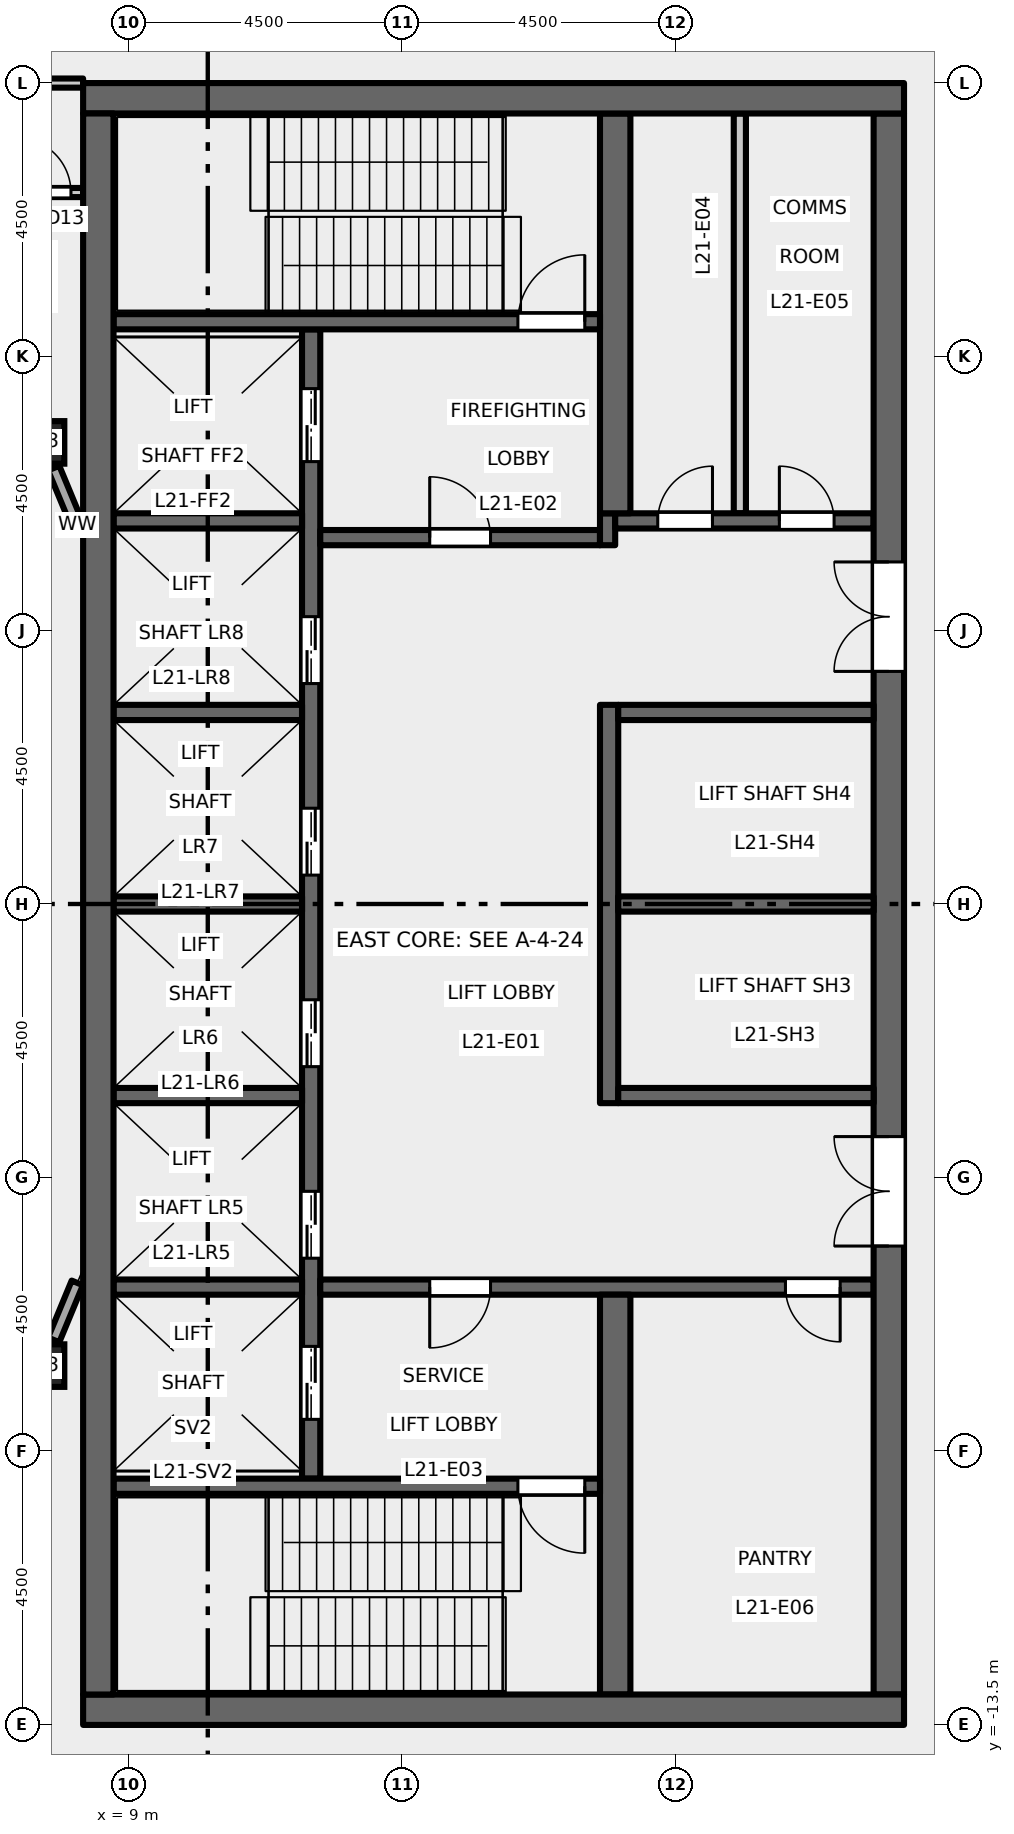
"""IFC4 building model, lengths in metres.
Left out: names, types, materials, properties, quantities, classifications, styles, units other than length and angle.
Written with IfcOpenShell. Run it as: python <this file> out.ifc"""

import sys

from ifc_helpers import new_model, si_unit, direction, frame, frame_2d, origin, origin_2d, place, context, subcontext, project, spatial, rectangle, hollow_rectangle, extrude, element, fill, save


model = new_model("IFC4")
c1 = context("Model", 3, precision=1e-05, world=origin(), true_north=direction((0.0, 1.0)))
c2 = subcontext(c1, "Body", "Model", "MODEL_VIEW")
j1 = project(units=[si_unit("LENGTHUNIT", "METRE"), si_unit("PLANEANGLEUNIT", "RADIAN")], contexts=[c1])
p1 = place(None, origin())
s1 = spatial("IfcSite", under=j1, at=p1, CompositionType="ELEMENT")
p2 = place(p1, origin())
s2 = spatial("IfcBuilding", under=s1, at=p2, CompositionType="ELEMENT")
p3 = place(p2, frame((0.0, 0.0, 99.2)))
s3 = spatial("IfcBuildingStorey", under=s2, at=p3, CompositionType="ELEMENT", Elevation=99.2)
for number, where, z_axis, x_axis in (
    (1, (7.591, -7.591, 0.0), (0.0, 0.0, 1.0), (1.0, 0.0, 0.0)),
    (2, (7.591, 7.591, 0.0), (0.0, 0.0, 1.0), (1.0, 0.0, 0.0)),
):
    element("IfcColumn", number, at=place(p3, frame(where, z_axis=z_axis, x_axis=x_axis)), inside=s3, PredefinedType="COLUMN", context=c2, shape_type="SweptSolid", body=[
        extrude(hollow_rectangle(XDim=0.7, YDim=0.7, WallThickness=0.04, at=origin_2d()), origin(), (0.0, 0.0, 1.0), 5.5),
    ])
p4 = place(p3, frame((12.0, -9.45, 0.0), z_axis=(0.0, 0.0, 1.0), x_axis=(0.0, 1.0, 0.0)))
e3 = element("IfcWall", 3, at=p4, inside=s3, PredefinedType="SHEAR", context=c2, shape_type="SweptSolid", body=[
    extrude(rectangle(XDim=18.9, YDim=0.3, at=frame_2d((9.45, 0.0))), origin(), (0.0, 0.0, 1.0), 5.35),
])
p5 = place(p4, frame((3.625, 0.0, 0.0)))
e4 = element("IfcOpeningElement", 4, at=p5, cuts=e3, PredefinedType="OPENING", context=c2, shape_type="SweptSolid", body=[
    extrude(rectangle(XDim=1.1, YDim=2.1, at=frame_2d((0.55, 1.05))), frame((0.0, 0.16, 0.0), z_axis=(0.0, -1.0, 0.0), x_axis=(1.0, 0.0, 0.0)), (0.0, 0.0, 1.0), 0.32),
])
p6 = place(p4, frame((6.775, 0.0, 0.0)))
e5 = element("IfcOpeningElement", 5, at=p6, cuts=e3, PredefinedType="OPENING", context=c2, shape_type="SweptSolid", body=[
    extrude(rectangle(XDim=1.1, YDim=2.1, at=frame_2d((0.55, 1.05))), frame((0.0, 0.16, 0.0), z_axis=(0.0, -1.0, 0.0), x_axis=(1.0, 0.0, 0.0)), (0.0, 0.0, 1.0), 0.32),
])
p7 = place(p4, frame((9.925, 0.0, 0.0)))
e6 = element("IfcOpeningElement", 6, at=p7, cuts=e3, PredefinedType="OPENING", context=c2, shape_type="SweptSolid", body=[
    extrude(rectangle(XDim=1.1, YDim=2.1, at=frame_2d((0.55, 1.05))), frame((0.0, 0.16, 0.0), z_axis=(0.0, -1.0, 0.0), x_axis=(1.0, 0.0, 0.0)), (0.0, 0.0, 1.0), 0.32),
])
p8 = place(p4, frame((13.075, 0.0, 0.0)))
e7 = element("IfcOpeningElement", 7, at=p8, cuts=e3, PredefinedType="OPENING", context=c2, shape_type="SweptSolid", body=[
    extrude(rectangle(XDim=1.1, YDim=2.1, at=frame_2d((0.55, 1.05))), frame((0.0, 0.16, 0.0), z_axis=(0.0, -1.0, 0.0), x_axis=(1.0, 0.0, 0.0)), (0.0, 0.0, 1.0), 0.32),
])
p9 = place(p4, frame((16.725, 0.0, 0.0)))
e8 = element("IfcOpeningElement", 8, at=p9, cuts=e3, PredefinedType="OPENING", context=c2, shape_type="SweptSolid", body=[
    extrude(rectangle(XDim=1.2, YDim=2.1, at=frame_2d((0.6, 1.05))), frame((0.0, 0.16, 0.0), z_axis=(0.0, -1.0, 0.0), x_axis=(1.0, 0.0, 0.0)), (0.0, 0.0, 1.0), 0.32),
])
p10 = place(p4, frame((0.975, 0.0, 0.0)))
e9 = element("IfcOpeningElement", 9, at=p10, cuts=e3, PredefinedType="OPENING", context=c2, shape_type="SweptSolid", body=[
    extrude(rectangle(XDim=1.2, YDim=2.1, at=frame_2d((0.6, 1.05))), frame((0.0, 0.16, 0.0), z_axis=(0.0, -1.0, 0.0), x_axis=(1.0, 0.0, 0.0)), (0.0, 0.0, 1.0), 0.32),
])
p11 = place(p3, frame((12.15, 6.025, 0.0), z_axis=(0.0, 0.0, 1.0), x_axis=(1.0, 0.0, 0.0)))
e10 = element("IfcWall", 10, at=p11, inside=s3, PredefinedType="SHEAR", context=c2, shape_type="SweptSolid", body=[
    extrude(rectangle(XDim=4.6, YDim=0.25, at=frame_2d((2.3, 0.0))), origin(), (0.0, 0.0, 1.0), 5.35),
])
p12 = place(p11, frame((1.8, 0.0, 0.0)))
e11 = element("IfcOpeningElement", 11, at=p12, cuts=e10, PredefinedType="OPENING", context=c2, shape_type="SweptSolid", body=[
    extrude(rectangle(XDim=1.0, YDim=2.1, at=frame_2d((0.5, 1.05))), frame((0.0, 0.135, 0.0), z_axis=(0.0, -1.0, 0.0), x_axis=(1.0, 0.0, 0.0)), (0.0, 0.0, 1.0), 0.27),
])
p13 = place(p3, frame((16.875, 5.9, 0.0), z_axis=(0.0, 0.0, 1.0), x_axis=(0.0, 1.0, 0.0)))
e12 = element("IfcWall", 12, at=p13, inside=s3, PredefinedType="SHEAR", context=c2, shape_type="SweptSolid", body=[
    extrude(rectangle(XDim=0.525, YDim=0.25, at=frame_2d((0.263, 0.0))), origin(), (0.0, 0.0, 1.0), 5.35),
])
p14 = place(p3, frame((17.0, 6.3, 0.0), z_axis=(0.0, 0.0, 1.0), x_axis=(1.0, 0.0, 0.0)))
e13 = element("IfcWall", 13, at=p14, inside=s3, PredefinedType="SHEAR", context=c2, shape_type="SweptSolid", body=[
    extrude(rectangle(XDim=4.25, YDim=0.25, at=frame_2d((2.125, 0.0))), origin(), (0.0, 0.0, 1.0), 5.35),
])
p15 = place(p14, frame((0.7, 0.0, 0.0)))
e14 = element("IfcOpeningElement", 14, at=p15, cuts=e13, PredefinedType="OPENING", context=c2, shape_type="SweptSolid", body=[
    extrude(rectangle(XDim=0.9, YDim=2.1, at=frame_2d((0.45, 1.05))), frame((0.0, 0.135, 0.0), z_axis=(0.0, -1.0, 0.0), x_axis=(1.0, 0.0, 0.0)), (0.0, 0.0, 1.0), 0.27),
])
p16 = place(p14, frame((2.7, 0.0, 0.0)))
e15 = element("IfcOpeningElement", 15, at=p16, cuts=e13, PredefinedType="OPENING", context=c2, shape_type="SweptSolid", body=[
    extrude(rectangle(XDim=0.9, YDim=2.1, at=frame_2d((0.45, 1.05))), frame((0.0, 0.135, 0.0), z_axis=(0.0, -1.0, 0.0), x_axis=(1.0, 0.0, 0.0)), (0.0, 0.0, 1.0), 0.27),
])
p17 = place(p3, frame((12.15, -6.3, 0.0), z_axis=(0.0, 0.0, 1.0), x_axis=(1.0, 0.0, 0.0)))
e16 = element("IfcWall", 16, at=p17, inside=s3, PredefinedType="SHEAR", context=c2, shape_type="SweptSolid", body=[
    extrude(rectangle(XDim=9.1, YDim=0.25, at=frame_2d((4.55, 0.0))), origin(), (0.0, 0.0, 1.0), 5.35),
])
p18 = place(p17, frame((1.8, 0.0, 0.0)))
e17 = element("IfcOpeningElement", 17, at=p18, cuts=e16, PredefinedType="OPENING", context=c2, shape_type="SweptSolid", body=[
    extrude(rectangle(XDim=1.0, YDim=2.1, at=frame_2d((0.5, 1.05))), frame((0.0, 0.135, 0.0), z_axis=(0.0, -1.0, 0.0), x_axis=(1.0, 0.0, 0.0)), (0.0, 0.0, 1.0), 0.27),
])
p19 = place(p17, frame((7.65, 0.0, 0.0)))
e18 = element("IfcOpeningElement", 18, at=p19, cuts=e16, PredefinedType="OPENING", context=c2, shape_type="SweptSolid", body=[
    extrude(rectangle(XDim=0.9, YDim=2.1, at=frame_2d((0.45, 1.05))), frame((0.0, 0.135, 0.0), z_axis=(0.0, -1.0, 0.0), x_axis=(1.0, 0.0, 0.0)), (0.0, 0.0, 1.0), 0.27),
])
p20 = place(p3, frame((21.5, -13.0, 0.0), z_axis=(0.0, 0.0, 1.0), x_axis=(0.0, 1.0, 0.0)))
e19 = element("IfcWall", 19, at=p20, inside=s3, PredefinedType="SHEAR", context=c2, shape_type="SweptSolid", body=[
    extrude(rectangle(XDim=26.0, YDim=0.5, at=frame_2d((13.0, 0.0))), origin(), (0.0, 0.0, 1.0), 5.35),
])
p21 = place(p20, frame((16.825, 0.0, 0.0)))
e20 = element("IfcOpeningElement", 20, at=p21, cuts=e19, PredefinedType="OPENING", context=c2, shape_type="SweptSolid", body=[
    extrude(rectangle(XDim=1.8, YDim=2.1, at=frame_2d((0.9, 1.05))), frame((0.0, 0.26, 0.0), z_axis=(0.0, -1.0, 0.0), x_axis=(1.0, 0.0, 0.0)), (0.0, 0.0, 1.0), 0.52),
])
p22 = place(p20, frame((7.375, 0.0, 0.0)))
e21 = element("IfcOpeningElement", 21, at=p22, cuts=e19, PredefinedType="OPENING", context=c2, shape_type="SweptSolid", body=[
    extrude(rectangle(XDim=1.8, YDim=2.1, at=frame_2d((0.9, 1.05))), frame((0.0, 0.26, 0.0), z_axis=(0.0, -1.0, 0.0), x_axis=(1.0, 0.0, 0.0)), (0.0, 0.0, 1.0), 0.52),
])
p23 = place(p3, frame((19.05, 6.425, 0.0), z_axis=(0.0, 0.0, 1.0), x_axis=(0.0, 1.0, 0.0)))
e22 = element("IfcWall", 22, at=p23, inside=s3, PredefinedType="PARTITIONING", context=c2, shape_type="SweptSolid", body=[
    extrude(rectangle(XDim=6.575, YDim=0.2, at=frame_2d((3.288, 0.0))), origin(), (0.0, 0.0, 1.0), 5.35),
])
p24 = place(p3, frame((16.9, -3.275, 0.0), z_axis=(0.0, 0.0, 1.0), x_axis=(0.0, 1.0, 0.0)))
e23 = element("IfcWall", 23, at=p24, inside=s3, PredefinedType="SHEAR", context=c2, shape_type="SweptSolid", body=[
    extrude(rectangle(XDim=6.55, YDim=0.3, at=frame_2d((3.275, 0.0))), origin(), (0.0, 0.0, 1.0), 5.35),
])
for number, where, z_axis, x_axis in (
    (24, (17.05, 0.0, 0.0), (0.0, 0.0, 1.0), (1.0, 0.0, 0.0)),
    (25, (17.05, 3.15, 0.0), (0.0, 0.0, 1.0), (1.0, 0.0, 0.0)),
    (26, (17.05, -3.15, 0.0), (0.0, 0.0, 1.0), (1.0, 0.0, 0.0)),
):
    element("IfcWall", number, at=place(p3, frame(where, z_axis=z_axis, x_axis=x_axis)), inside=s3, PredefinedType="SHEAR", context=c2, shape_type="SweptSolid", body=[
        extrude(rectangle(XDim=4.2, YDim=0.25, at=frame_2d((2.1, 0.0))), origin(), (0.0, 0.0, 1.0), 5.35),
    ])
for number, where, z_axis, x_axis in (
    (27, (17.0, 6.425, 0.0), (0.0, 0.0, 1.0), (0.0, 1.0, 0.0)),
    (28, (17.0, -13.0, 0.0), (0.0, 0.0, 1.0), (0.0, 1.0, 0.0)),
):
    element("IfcWall", number, at=place(p3, frame(where, z_axis=z_axis, x_axis=x_axis)), inside=s3, PredefinedType="SHEAR", context=c2, shape_type="SweptSolid", body=[
        extrude(rectangle(XDim=6.575, YDim=0.5, at=frame_2d((3.288, 0.0))), origin(), (0.0, 0.0, 1.0), 5.35),
    ])
for number, where, z_axis, x_axis in (
    (29, (8.75, 0.0, 0.0), (0.0, 0.0, 1.0), (1.0, 0.0, 0.0)),
    (30, (8.75, 3.15, 0.0), (0.0, 0.0, 1.0), (1.0, 0.0, 0.0)),
    (31, (8.75, 6.3, 0.0), (0.0, 0.0, 1.0), (1.0, 0.0, 0.0)),
    (32, (8.75, -3.15, 0.0), (0.0, 0.0, 1.0), (1.0, 0.0, 0.0)),
    (33, (8.75, -6.3, 0.0), (0.0, 0.0, 1.0), (1.0, 0.0, 0.0)),
):
    element("IfcWall", number, at=place(p3, frame(where, z_axis=z_axis, x_axis=x_axis)), inside=s3, PredefinedType="SHEAR", context=c2, shape_type="SweptSolid", body=[
        extrude(rectangle(XDim=3.1, YDim=0.25, at=frame_2d((1.55, 0.0))), origin(), (0.0, 0.0, 1.0), 5.35),
    ])
p25 = place(p3, frame((8.75, 9.575, 0.0), z_axis=(0.0, 0.0, 1.0), x_axis=(1.0, 0.0, 0.0)))
e34 = element("IfcWall", 34, at=p25, inside=s3, PredefinedType="SHEAR", context=c2, shape_type="SweptSolid", body=[
    extrude(rectangle(XDim=8.0, YDim=0.25, at=frame_2d((4.0, 0.0))), origin(), (0.0, 0.0, 1.0), 5.35),
])
p26 = place(p25, frame((6.65, 0.0, 0.0)))
e35 = element("IfcOpeningElement", 35, at=p26, cuts=e34, PredefinedType="OPENING", context=c2, shape_type="SweptSolid", body=[
    extrude(rectangle(XDim=1.1, YDim=2.1, at=frame_2d((0.55, 1.05))), frame((0.0, 0.135, 0.0), z_axis=(0.0, -1.0, 0.0), x_axis=(1.0, 0.0, 0.0)), (0.0, 0.0, 1.0), 0.27),
])
p27 = place(p3, frame((8.75, -9.575, 0.0), z_axis=(0.0, 0.0, 1.0), x_axis=(1.0, 0.0, 0.0)))
e36 = element("IfcWall", 36, at=p27, inside=s3, PredefinedType="SHEAR", context=c2, shape_type="SweptSolid", body=[
    extrude(rectangle(XDim=8.0, YDim=0.25, at=frame_2d((4.0, 0.0))), origin(), (0.0, 0.0, 1.0), 5.35),
])
p28 = place(p27, frame((6.65, 0.0, 0.0)))
e37 = element("IfcOpeningElement", 37, at=p28, cuts=e36, PredefinedType="OPENING", context=c2, shape_type="SweptSolid", body=[
    extrude(rectangle(XDim=1.1, YDim=2.1, at=frame_2d((0.55, 1.05))), frame((0.0, 0.135, 0.0), z_axis=(0.0, -1.0, 0.0), x_axis=(1.0, 0.0, 0.0)), (0.0, 0.0, 1.0), 0.27),
])
for number, where, z_axis, x_axis in (
    (38, (8.25, 13.25, 0.0), (0.0, 0.0, 1.0), (1.0, 0.0, 0.0)),
    (39, (8.25, -13.25, 0.0), (0.0, 0.0, 1.0), (1.0, 0.0, 0.0)),
):
    element("IfcWall", number, at=place(p3, frame(where, z_axis=z_axis, x_axis=x_axis)), inside=s3, PredefinedType="SHEAR", context=c2, shape_type="SweptSolid", body=[
        extrude(rectangle(XDim=13.5, YDim=0.5, at=frame_2d((6.75, 0.0))), origin(), (0.0, 0.0, 1.0), 5.35),
    ])
p29 = place(p3, frame((8.5, -13.0, 0.0), z_axis=(0.0, 0.0, 1.0), x_axis=(0.0, 1.0, 0.0)))
e40 = element("IfcWall", 40, at=p29, inside=s3, PredefinedType="SHEAR", context=c2, shape_type="SweptSolid", body=[
    extrude(rectangle(XDim=26.0, YDim=0.5, at=frame_2d((13.0, 0.0))), origin(), (0.0, 0.0, 1.0), 5.35),
])
for number, where, z_axis, x_axis in (
    (41, (7.766, -7.168, 0.0), (0.0, 0.0, 1.0), (0.383, 0.924, 0.0)),
    (42, (8.154, 6.231, 0.0), (0.0, 0.0, 1.0), (-0.383, 0.924, 0.0)),
):
    element("IfcWall", number, at=place(p3, frame(where, z_axis=z_axis, x_axis=x_axis)), inside=s3, PredefinedType="STANDARD", context=c2, shape_type="SweptSolid", body=[
        extrude(rectangle(XDim=1.015, YDim=0.2, at=frame_2d((0.507, 0.0))), origin(), (0.0, 0.0, 1.0), 4.826),
    ])
p30 = place(p3, frame((7.0, 11.7, 0.0), z_axis=(0.0, 0.0, 1.0), x_axis=(1.0, 0.0, 0.0)))
e43 = element("IfcWall", 43, at=p30, inside=s3, PredefinedType="PARTITIONING", context=c2, shape_type="SweptSolid", body=[
    extrude(rectangle(XDim=1.25, YDim=0.15, at=frame_2d((0.625, 0.0))), origin(), (0.0, 0.0, 1.0), 5.35),
])
p31 = place(p30, frame((0.15, 0.0, 0.0)))
e44 = element("IfcOpeningElement", 44, at=p31, cuts=e43, PredefinedType="OPENING", context=c2, shape_type="SweptSolid", body=[
    extrude(rectangle(XDim=0.9, YDim=2.1, at=frame_2d((0.45, 1.05))), frame((0.0, 0.085, 0.0), z_axis=(0.0, -1.0, 0.0), x_axis=(1.0, 0.0, 0.0)), (0.0, 0.0, 1.0), 0.17),
])
p32 = place(p3, frame((-8.25, 13.5, 0.0), z_axis=(0.0, 0.0, 1.0), x_axis=(1.0, 0.0, 0.0)))
e45 = element("IfcWall", 45, at=p32, inside=s3, PredefinedType="PARTITIONING", context=c2, shape_type="SweptSolid", body=[
    extrude(rectangle(XDim=16.5, YDim=0.15, at=frame_2d((8.25, 0.0))), origin(), (0.0, 0.0, 1.0), 5.35),
])
p33 = place(p32, frame((0.65, 0.0, 0.0)))
e46 = element("IfcOpeningElement", 46, at=p33, cuts=e45, PredefinedType="OPENING", context=c2, shape_type="SweptSolid", body=[
    extrude(rectangle(XDim=1.0, YDim=2.1, at=frame_2d((0.5, 1.05))), frame((0.0, 0.085, 0.0), z_axis=(0.0, -1.0, 0.0), x_axis=(1.0, 0.0, 0.0)), (0.0, 0.0, 1.0), 0.17),
])
p34 = place(p12, origin())
e47 = element("IfcDoor", 47, at=p34, inside=s3, OperationType="SINGLE_SWING_RIGHT", PredefinedType="DOOR", context=c2, shape_type="SweptSolid", body=[
    extrude(rectangle(XDim=1.0, YDim=2.1, at=frame_2d((0.5, 1.05))), frame((0.0, 0.025, 0.0), z_axis=(0.0, -1.0, 0.0), x_axis=(1.0, 0.0, 0.0)), (0.0, 0.0, 1.0), 0.05),
])
fill(e11, e47)
p35 = place(p18, origin())
e48 = element("IfcDoor", 48, at=p35, inside=s3, OperationType="SINGLE_SWING_LEFT", PredefinedType="DOOR", context=c2, shape_type="SweptSolid", body=[
    extrude(rectangle(XDim=1.0, YDim=2.1, at=frame_2d((0.5, 1.05))), frame((0.0, 0.025, 0.0), z_axis=(0.0, -1.0, 0.0), x_axis=(1.0, 0.0, 0.0)), (0.0, 0.0, 1.0), 0.05),
])
fill(e17, e48)
p36 = place(p26, origin())
e49 = element("IfcDoor", 49, at=p36, inside=s3, OperationType="SINGLE_SWING_LEFT", PredefinedType="DOOR", context=c2, shape_type="SweptSolid", body=[
    extrude(rectangle(XDim=1.1, YDim=2.1, at=frame_2d((0.55, 1.05))), frame((0.0, 0.025, 0.0), z_axis=(0.0, -1.0, 0.0), x_axis=(1.0, 0.0, 0.0)), (0.0, 0.0, 1.0), 0.05),
])
fill(e35, e49)
p37 = place(p28, origin())
e50 = element("IfcDoor", 50, at=p37, inside=s3, OperationType="SINGLE_SWING_RIGHT", PredefinedType="DOOR", context=c2, shape_type="SweptSolid", body=[
    extrude(rectangle(XDim=1.1, YDim=2.1, at=frame_2d((0.55, 1.05))), frame((0.0, 0.025, 0.0), z_axis=(0.0, -1.0, 0.0), x_axis=(1.0, 0.0, 0.0)), (0.0, 0.0, 1.0), 0.05),
])
fill(e37, e50)
p38 = place(p21, origin())
e51 = element("IfcDoor", 51, at=p38, inside=s3, OperationType="DOUBLE_DOOR_DOUBLE_SWING", PredefinedType="DOOR", context=c2, shape_type="SweptSolid", body=[
    extrude(rectangle(XDim=1.8, YDim=2.1, at=frame_2d((0.9, 1.05))), frame((0.0, 0.025, 0.0), z_axis=(0.0, -1.0, 0.0), x_axis=(1.0, 0.0, 0.0)), (0.0, 0.0, 1.0), 0.05),
])
fill(e20, e51)
p39 = place(p22, origin())
e52 = element("IfcDoor", 52, at=p39, inside=s3, OperationType="DOUBLE_DOOR_DOUBLE_SWING", PredefinedType="DOOR", context=c2, shape_type="SweptSolid", body=[
    extrude(rectangle(XDim=1.8, YDim=2.1, at=frame_2d((0.9, 1.05))), frame((0.0, 0.025, 0.0), z_axis=(0.0, -1.0, 0.0), x_axis=(1.0, 0.0, 0.0)), (0.0, 0.0, 1.0), 0.05),
])
fill(e21, e52)
p40 = place(p5, origin())
e53 = element("IfcDoor", 53, at=p40, inside=s3, OperationType="DOUBLE_DOOR_SLIDING", PredefinedType="DOOR", context=c2, shape_type="SweptSolid", body=[
    extrude(rectangle(XDim=1.1, YDim=2.1, at=frame_2d((0.55, 1.05))), frame((0.0, 0.025, 0.0), z_axis=(0.0, -1.0, 0.0), x_axis=(1.0, 0.0, 0.0)), (0.0, 0.0, 1.0), 0.05),
])
fill(e4, e53)
p41 = place(p6, origin())
e54 = element("IfcDoor", 54, at=p41, inside=s3, OperationType="DOUBLE_DOOR_SLIDING", PredefinedType="DOOR", context=c2, shape_type="SweptSolid", body=[
    extrude(rectangle(XDim=1.1, YDim=2.1, at=frame_2d((0.55, 1.05))), frame((0.0, 0.025, 0.0), z_axis=(0.0, -1.0, 0.0), x_axis=(1.0, 0.0, 0.0)), (0.0, 0.0, 1.0), 0.05),
])
fill(e5, e54)
p42 = place(p7, origin())
e55 = element("IfcDoor", 55, at=p42, inside=s3, OperationType="DOUBLE_DOOR_SLIDING", PredefinedType="DOOR", context=c2, shape_type="SweptSolid", body=[
    extrude(rectangle(XDim=1.1, YDim=2.1, at=frame_2d((0.55, 1.05))), frame((0.0, 0.025, 0.0), z_axis=(0.0, -1.0, 0.0), x_axis=(1.0, 0.0, 0.0)), (0.0, 0.0, 1.0), 0.05),
])
fill(e6, e55)
p43 = place(p8, origin())
e56 = element("IfcDoor", 56, at=p43, inside=s3, OperationType="DOUBLE_DOOR_SLIDING", PredefinedType="DOOR", context=c2, shape_type="SweptSolid", body=[
    extrude(rectangle(XDim=1.1, YDim=2.1, at=frame_2d((0.55, 1.05))), frame((0.0, 0.025, 0.0), z_axis=(0.0, -1.0, 0.0), x_axis=(1.0, 0.0, 0.0)), (0.0, 0.0, 1.0), 0.05),
])
fill(e7, e56)
p44 = place(p9, origin())
e57 = element("IfcDoor", 57, at=p44, inside=s3, OperationType="DOUBLE_DOOR_SLIDING", PredefinedType="DOOR", context=c2, shape_type="SweptSolid", body=[
    extrude(rectangle(XDim=1.2, YDim=2.1, at=frame_2d((0.6, 1.05))), frame((0.0, 0.025, 0.0), z_axis=(0.0, -1.0, 0.0), x_axis=(1.0, 0.0, 0.0)), (0.0, 0.0, 1.0), 0.05),
])
fill(e8, e57)
p45 = place(p10, origin())
e58 = element("IfcDoor", 58, at=p45, inside=s3, OperationType="DOUBLE_DOOR_SLIDING", PredefinedType="DOOR", context=c2, shape_type="SweptSolid", body=[
    extrude(rectangle(XDim=1.2, YDim=2.1, at=frame_2d((0.6, 1.05))), frame((0.0, 0.025, 0.0), z_axis=(0.0, -1.0, 0.0), x_axis=(1.0, 0.0, 0.0)), (0.0, 0.0, 1.0), 0.05),
])
fill(e9, e58)
p46 = place(p15, origin())
e59 = element("IfcDoor", 59, at=p46, inside=s3, OperationType="SINGLE_SWING_LEFT", PredefinedType="DOOR", context=c2, shape_type="SweptSolid", body=[
    extrude(rectangle(XDim=0.9, YDim=2.1, at=frame_2d((0.45, 1.05))), frame((0.0, 0.025, 0.0), z_axis=(0.0, -1.0, 0.0), x_axis=(1.0, 0.0, 0.0)), (0.0, 0.0, 1.0), 0.05),
])
fill(e14, e59)
p47 = place(p16, origin())
e60 = element("IfcDoor", 60, at=p47, inside=s3, OperationType="SINGLE_SWING_RIGHT", PredefinedType="DOOR", context=c2, shape_type="SweptSolid", body=[
    extrude(rectangle(XDim=0.9, YDim=2.1, at=frame_2d((0.45, 1.05))), frame((0.0, 0.025, 0.0), z_axis=(0.0, -1.0, 0.0), x_axis=(1.0, 0.0, 0.0)), (0.0, 0.0, 1.0), 0.05),
])
fill(e15, e60)
p48 = place(p19, origin())
e61 = element("IfcDoor", 61, at=p48, inside=s3, OperationType="SINGLE_SWING_RIGHT", PredefinedType="DOOR", context=c2, shape_type="SweptSolid", body=[
    extrude(rectangle(XDim=0.9, YDim=2.1, at=frame_2d((0.45, 1.05))), frame((0.0, 0.025, 0.0), z_axis=(0.0, -1.0, 0.0), x_axis=(1.0, 0.0, 0.0)), (0.0, 0.0, 1.0), 0.05),
])
fill(e18, e61)
p49 = place(p31, origin())
e62 = element("IfcDoor", 62, at=p49, inside=s3, OperationType="SINGLE_SWING_LEFT", PredefinedType="DOOR", context=c2, shape_type="SweptSolid", body=[
    extrude(rectangle(XDim=0.9, YDim=2.1, at=frame_2d((0.45, 1.05))), frame((0.0, 0.025, 0.0), z_axis=(0.0, -1.0, 0.0), x_axis=(1.0, 0.0, 0.0)), (0.0, 0.0, 1.0), 0.05),
])
fill(e44, e62)
save(model, sys.argv[1])
